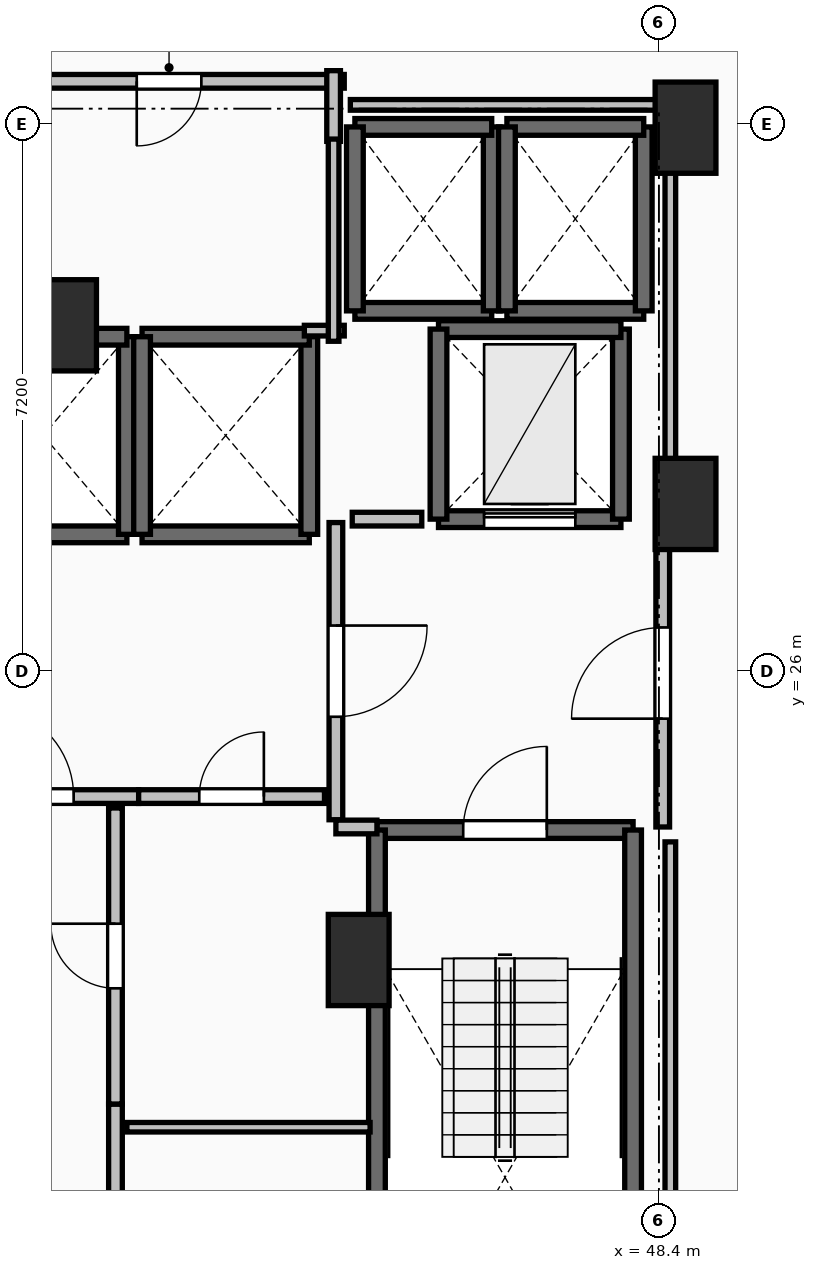
"""IFC4 building model, lengths in metres.
Left out: names, types, materials, properties, quantities, classifications, styles, units other than length and angle.
Written with IfcOpenShell. Run it as: python <this file> out.ifc"""

import sys

from ifc_helpers import new_model, si_unit, direction, frame, frame_2d, origin, origin_2d, place, context, subcontext, project, spatial, rectangle, extrude, element, fill, save


model = new_model("IFC4")
c1 = context("Model", 3, precision=1e-05, world=origin(), true_north=direction((0.0, 1.0)))
c2 = subcontext(c1, "Body", "Model", "MODEL_VIEW")
j1 = project(units=[si_unit("LENGTHUNIT", "METRE"), si_unit("PLANEANGLEUNIT", "RADIAN")], contexts=[c1])
p1 = place(None, origin())
s1 = spatial("IfcSite", under=j1, at=p1, CompositionType="ELEMENT")
p2 = place(p1, origin())
s2 = spatial("IfcBuilding", under=s1, at=p2, CompositionType="ELEMENT")
p3 = place(p2, frame((0.0, 0.0, 82.3)))
s3 = spatial("IfcBuildingStorey", under=s2, at=p3, CompositionType="ELEMENT", Elevation=82.3)
for number, where, z_axis, x_axis in (
    (1, (48.75, 33.15, 0.0), (0.0, 0.0, 1.0), (1.0, 0.0, 0.0)),
    (2, (48.75, 28.2, 0.0), (0.0, 0.0, 1.0), (1.0, 0.0, 0.0)),
    (3, (44.45, 22.2, 0.0), (0.0, 0.0, 1.0), (1.0, 0.0, 0.0)),
    (4, (40.6, 30.55, 0.0), (0.0, 0.0, 1.0), (1.0, 0.0, 0.0)),
):
    element("IfcColumn", number, at=place(p3, frame(where, z_axis=z_axis, x_axis=x_axis)), inside=s3, PredefinedType="PILASTER", context=c2, shape_type="SweptSolid", body=[
        extrude(rectangle(XDim=0.8, YDim=1.2, at=origin_2d()), origin(), (0.0, 0.0, 1.0), 3.5),
    ])
p4 = place(p3, frame((44.69, 23.91, 0.0), z_axis=(0.0, 0.0, 1.0), x_axis=(1.0, 0.0, 0.0)))
e5 = element("IfcWall", 5, at=p4, inside=s3, PredefinedType="SOLIDWALL", context=c2, shape_type="SweptSolid", body=[
    extrude(rectangle(XDim=3.37, YDim=0.22, at=frame_2d((1.685, 0.0))), origin(), (0.0, 0.0, 1.0), 3.24),
])
p5 = place(p4, frame((1.135, 0.0, 0.0)))
e6 = element("IfcOpeningElement", 6, at=p5, cuts=e5, PredefinedType="OPENING", context=c2, shape_type="SweptSolid", body=[
    extrude(rectangle(XDim=1.1, YDim=2.15, at=frame_2d((0.55, 1.075))), frame((0.0, 0.125, 0.0), z_axis=(0.0, -1.0, 0.0), x_axis=(1.0, 0.0, 0.0)), (0.0, 0.0, 1.0), 0.25),
])
for number, where, z_axis, x_axis in (
    (7, (48.06, 23.91, 0.0), (0.0, 0.0, 1.0), (0.0, -1.0, 0.0)),
    (8, (44.69, 16.49, 0.0), (0.0, 0.0, 1.0), (0.0, 1.0, 0.0)),
):
    element("IfcWall", number, at=place(p3, frame(where, z_axis=z_axis, x_axis=x_axis)), inside=s3, PredefinedType="SOLIDWALL", context=c2, shape_type="SweptSolid", body=[
        extrude(rectangle(XDim=7.42, YDim=0.22, at=frame_2d((3.71, 0.0))), origin(), (0.0, 0.0, 1.0), 3.24),
    ])
p6 = place(p3, frame((39.2, 27.8, 0.0), z_axis=(0.0, 0.0, 1.0), x_axis=(1.0, 0.0, 0.0)))
e9 = element("IfcWall", 9, at=p6, inside=s3, PredefinedType="SOLIDWALL", context=c2, shape_type="SweptSolid", body=[
    extrude(rectangle(XDim=2.2, YDim=0.22, at=frame_2d((1.1, 0.0))), origin(), (0.0, 0.0, 1.0), 3.24),
])
p7 = place(p3, frame((41.4, 27.8, 0.0), z_axis=(0.0, 0.0, 1.0), x_axis=(0.0, 1.0, 0.0)))
e10 = element("IfcWall", 10, at=p7, inside=s3, PredefinedType="SOLIDWALL", context=c2, shape_type="SweptSolid", body=[
    extrude(rectangle(XDim=2.6, YDim=0.22, at=frame_2d((1.3, 0.0))), origin(), (0.0, 0.0, 1.0), 3.24),
])
for number, where, z_axis, x_axis in (
    (11, (41.4, 30.4, 0.0), (0.0, 0.0, 1.0), (-1.0, 0.0, 0.0)),
    (12, (41.6, 27.8, 0.0), (0.0, 0.0, 1.0), (1.0, 0.0, 0.0)),
):
    element("IfcWall", number, at=place(p3, frame(where, z_axis=z_axis, x_axis=x_axis)), inside=s3, PredefinedType="SOLIDWALL", context=c2, shape_type="SweptSolid", body=[
        extrude(rectangle(XDim=2.2, YDim=0.22, at=frame_2d((1.1, 0.0))), origin(), (0.0, 0.0, 1.0), 3.24),
    ])
p8 = place(p3, frame((43.8, 27.8, 0.0), z_axis=(0.0, 0.0, 1.0), x_axis=(0.0, 1.0, 0.0)))
e13 = element("IfcWall", 13, at=p8, inside=s3, PredefinedType="SOLIDWALL", context=c2, shape_type="SweptSolid", body=[
    extrude(rectangle(XDim=2.6, YDim=0.22, at=frame_2d((1.3, 0.0))), origin(), (0.0, 0.0, 1.0), 3.24),
])
p9 = place(p3, frame((43.8, 30.4, 0.0), z_axis=(0.0, 0.0, 1.0), x_axis=(-1.0, 0.0, 0.0)))
e14 = element("IfcWall", 14, at=p9, inside=s3, PredefinedType="SOLIDWALL", context=c2, shape_type="SweptSolid", body=[
    extrude(rectangle(XDim=2.2, YDim=0.22, at=frame_2d((1.1, 0.0))), origin(), (0.0, 0.0, 1.0), 3.24),
])
p10 = place(p3, frame((41.6, 30.4, 0.0), z_axis=(0.0, 0.0, 1.0), x_axis=(0.0, -1.0, 0.0)))
e15 = element("IfcWall", 15, at=p10, inside=s3, PredefinedType="SOLIDWALL", context=c2, shape_type="SweptSolid", body=[
    extrude(rectangle(XDim=2.6, YDim=0.22, at=frame_2d((1.3, 0.0))), origin(), (0.0, 0.0, 1.0), 3.24),
])
p11 = place(p3, frame((44.4, 30.74, 0.0), z_axis=(0.0, 0.0, 1.0), x_axis=(1.0, 0.0, 0.0)))
e16 = element("IfcWall", 16, at=p11, inside=s3, PredefinedType="SOLIDWALL", context=c2, shape_type="SweptSolid", body=[
    extrude(rectangle(XDim=1.8, YDim=0.22, at=frame_2d((0.9, 0.0))), origin(), (0.0, 0.0, 1.0), 3.24),
])
p12 = place(p3, frame((46.2, 30.74, 0.0), z_axis=(0.0, 0.0, 1.0), x_axis=(0.0, 1.0, 0.0)))
e17 = element("IfcWall", 17, at=p12, inside=s3, PredefinedType="SOLIDWALL", context=c2, shape_type="SweptSolid", body=[
    extrude(rectangle(XDim=2.42, YDim=0.22, at=frame_2d((1.21, 0.0))), origin(), (0.0, 0.0, 1.0), 3.24),
])
p13 = place(p3, frame((46.2, 33.16, 0.0), z_axis=(0.0, 0.0, 1.0), x_axis=(-1.0, 0.0, 0.0)))
e18 = element("IfcWall", 18, at=p13, inside=s3, PredefinedType="SOLIDWALL", context=c2, shape_type="SweptSolid", body=[
    extrude(rectangle(XDim=1.8, YDim=0.22, at=frame_2d((0.9, 0.0))), origin(), (0.0, 0.0, 1.0), 3.24),
])
p14 = place(p3, frame((44.4, 33.16, 0.0), z_axis=(0.0, 0.0, 1.0), x_axis=(0.0, -1.0, 0.0)))
e19 = element("IfcWall", 19, at=p14, inside=s3, PredefinedType="SOLIDWALL", context=c2, shape_type="SweptSolid", body=[
    extrude(rectangle(XDim=2.42, YDim=0.22, at=frame_2d((1.21, 0.0))), origin(), (0.0, 0.0, 1.0), 3.24),
])
p15 = place(p3, frame((46.4, 30.74, 0.0), z_axis=(0.0, 0.0, 1.0), x_axis=(1.0, 0.0, 0.0)))
e20 = element("IfcWall", 20, at=p15, inside=s3, PredefinedType="SOLIDWALL", context=c2, shape_type="SweptSolid", body=[
    extrude(rectangle(XDim=1.8, YDim=0.22, at=frame_2d((0.9, 0.0))), origin(), (0.0, 0.0, 1.0), 3.24),
])
p16 = place(p3, frame((48.2, 30.74, 0.0), z_axis=(0.0, 0.0, 1.0), x_axis=(0.0, 1.0, 0.0)))
e21 = element("IfcWall", 21, at=p16, inside=s3, PredefinedType="SOLIDWALL", context=c2, shape_type="SweptSolid", body=[
    extrude(rectangle(XDim=2.42, YDim=0.22, at=frame_2d((1.21, 0.0))), origin(), (0.0, 0.0, 1.0), 3.24),
])
p17 = place(p3, frame((48.2, 33.16, 0.0), z_axis=(0.0, 0.0, 1.0), x_axis=(-1.0, 0.0, 0.0)))
e22 = element("IfcWall", 22, at=p17, inside=s3, PredefinedType="SOLIDWALL", context=c2, shape_type="SweptSolid", body=[
    extrude(rectangle(XDim=1.8, YDim=0.22, at=frame_2d((0.9, 0.0))), origin(), (0.0, 0.0, 1.0), 3.24),
])
p18 = place(p3, frame((46.4, 33.16, 0.0), z_axis=(0.0, 0.0, 1.0), x_axis=(0.0, -1.0, 0.0)))
e23 = element("IfcWall", 23, at=p18, inside=s3, PredefinedType="SOLIDWALL", context=c2, shape_type="SweptSolid", body=[
    extrude(rectangle(XDim=2.42, YDim=0.22, at=frame_2d((1.21, 0.0))), origin(), (0.0, 0.0, 1.0), 3.24),
])
p19 = place(p3, frame((45.5, 28.0, 0.0), z_axis=(0.0, 0.0, 1.0), x_axis=(1.0, 0.0, 0.0)))
e24 = element("IfcWall", 24, at=p19, inside=s3, PredefinedType="SHEAR", context=c2, shape_type="SweptSolid", body=[
    extrude(rectangle(XDim=2.4, YDim=0.22, at=frame_2d((1.2, 0.0))), origin(), (0.0, 0.0, 1.0), 3.24),
])
p20 = place(p19, frame((0.6, 0.0, 0.0)))
e25 = element("IfcOpeningElement", 25, at=p20, cuts=e24, PredefinedType="OPENING", context=c2, shape_type="SweptSolid", body=[
    extrude(rectangle(XDim=1.2, YDim=2.2, at=frame_2d((0.6, 1.1))), frame((0.0, 0.125, 0.0), z_axis=(0.0, -1.0, 0.0), x_axis=(1.0, 0.0, 0.0)), (0.0, 0.0, 1.0), 0.25),
])
p21 = place(p3, frame((47.9, 28.0, 0.0), z_axis=(0.0, 0.0, 1.0), x_axis=(0.0, 1.0, 0.0)))
e26 = element("IfcWall", 26, at=p21, inside=s3, PredefinedType="SHEAR", context=c2, shape_type="SweptSolid", body=[
    extrude(rectangle(XDim=2.5, YDim=0.22, at=frame_2d((1.25, 0.0))), origin(), (0.0, 0.0, 1.0), 3.24),
])
p22 = place(p3, frame((47.9, 30.5, 0.0), z_axis=(0.0, 0.0, 1.0), x_axis=(-1.0, 0.0, 0.0)))
e27 = element("IfcWall", 27, at=p22, inside=s3, PredefinedType="SHEAR", context=c2, shape_type="SweptSolid", body=[
    extrude(rectangle(XDim=2.4, YDim=0.22, at=frame_2d((1.2, 0.0))), origin(), (0.0, 0.0, 1.0), 3.24),
])
p23 = place(p3, frame((45.5, 30.5, 0.0), z_axis=(0.0, 0.0, 1.0), x_axis=(0.0, -1.0, 0.0)))
e28 = element("IfcWall", 28, at=p23, inside=s3, PredefinedType="SHEAR", context=c2, shape_type="SweptSolid", body=[
    extrude(rectangle(XDim=2.5, YDim=0.22, at=frame_2d((1.25, 0.0))), origin(), (0.0, 0.0, 1.0), 3.24),
])
p24 = place(p3, frame((44.15, 27.955, 0.0), z_axis=(0.0, 0.0, 1.0), x_axis=(0.0, -1.0, 0.0)))
e29 = element("IfcWall", 29, at=p24, inside=s3, PredefinedType="PARTITIONING", context=c2, shape_type="SweptSolid", body=[
    extrude(rectangle(XDim=3.91, YDim=0.18, at=frame_2d((1.955, 0.0))), origin(), (0.0, 0.0, 1.0), 3.24),
])
p25 = place(p24, frame((1.355, 0.0, 0.0)))
e30 = element("IfcOpeningElement", 30, at=p25, cuts=e29, PredefinedType="OPENING", context=c2, shape_type="SweptSolid", body=[
    extrude(rectangle(XDim=1.2, YDim=2.15, at=frame_2d((0.6, 1.075))), frame((0.0, 0.105, 0.0), z_axis=(0.0, -1.0, 0.0), x_axis=(1.0, 0.0, 0.0)), (0.0, 0.0, 1.0), 0.21),
])
p26 = place(p3, frame((44.15, 23.95, 0.0), z_axis=(0.0, 0.0, 1.0), x_axis=(1.0, 0.0, 0.0)))
e31 = element("IfcWall", 31, at=p26, inside=s3, PredefinedType="PARTITIONING", context=c2, shape_type="SweptSolid", body=[
    extrude(rectangle(XDim=0.54, YDim=0.18, at=frame_2d((0.27, 0.0))), origin(), (0.0, 0.0, 1.0), 3.24),
])
p27 = place(p3, frame((48.45, 23.95, 0.0), z_axis=(0.0, 0.0, 1.0), x_axis=(0.0, 1.0, 0.0)))
e32 = element("IfcWall", 32, at=p27, inside=s3, PredefinedType="PARTITIONING", context=c2, shape_type="SweptSolid", body=[
    extrude(rectangle(XDim=4.05, YDim=0.18, at=frame_2d((2.025, 0.0))), origin(), (0.0, 0.0, 1.0), 3.24),
])
p28 = place(p27, frame((1.425, 0.0, 0.0)))
e33 = element("IfcOpeningElement", 33, at=p28, cuts=e32, PredefinedType="OPENING", context=c2, shape_type="SweptSolid", body=[
    extrude(rectangle(XDim=1.2, YDim=2.15, at=frame_2d((0.6, 1.075))), frame((0.0, 0.105, 0.0), z_axis=(0.0, -1.0, 0.0), x_axis=(1.0, 0.0, 0.0)), (0.0, 0.0, 1.0), 0.21),
])
p29 = place(p3, frame((38.645, 24.35, 0.0), z_axis=(0.0, 0.0, 1.0), x_axis=(1.0, 0.0, 0.0)))
e34 = element("IfcWall", 34, at=p29, inside=s3, PredefinedType="PARTITIONING", context=c2, shape_type="SweptSolid", body=[
    extrude(rectangle(XDim=2.91, YDim=0.18, at=frame_2d((1.455, 0.0))), origin(), (0.0, 0.0, 1.0), 3.24),
])
p30 = place(p29, frame((0.855, 0.0, 0.0)))
e35 = element("IfcOpeningElement", 35, at=p30, cuts=e34, PredefinedType="OPENING", context=c2, shape_type="SweptSolid", body=[
    extrude(rectangle(XDim=1.2, YDim=2.15, at=frame_2d((0.6, 1.075))), frame((0.0, 0.105, 0.0), z_axis=(0.0, -1.0, 0.0), x_axis=(1.0, 0.0, 0.0)), (0.0, 0.0, 1.0), 0.21),
])
p31 = place(p3, frame((41.555, 24.35, 0.0), z_axis=(0.0, 0.0, 1.0), x_axis=(1.0, 0.0, 0.0)))
e36 = element("IfcWall", 36, at=p31, inside=s3, PredefinedType="PARTITIONING", context=c2, shape_type="SweptSolid", body=[
    extrude(rectangle(XDim=2.445, YDim=0.18, at=frame_2d((1.223, 0.0))), origin(), (0.0, 0.0, 1.0), 3.24),
])
p32 = place(p31, frame((0.798, 0.0, 0.0)))
e37 = element("IfcOpeningElement", 37, at=p32, cuts=e36, PredefinedType="OPENING", context=c2, shape_type="SweptSolid", body=[
    extrude(rectangle(XDim=0.85, YDim=2.1, at=frame_2d((0.425, 1.05))), frame((0.0, 0.105, 0.0), z_axis=(0.0, -1.0, 0.0), x_axis=(1.0, 0.0, 0.0)), (0.0, 0.0, 1.0), 0.21),
])
p33 = place(p3, frame((41.25, 16.32, 0.0), z_axis=(0.0, 0.0, 1.0), x_axis=(0.0, 1.0, 0.0)))
e38 = element("IfcWall", 38, at=p33, inside=s3, PredefinedType="PARTITIONING", context=c2, shape_type="SweptSolid", body=[
    extrude(rectangle(XDim=3.985, YDim=0.18, at=frame_2d((1.992, 0.0))), origin(), (0.0, 0.0, 1.0), 3.24),
])
p34 = place(p33, frame((1.593, 0.0, 0.0)))
e39 = element("IfcOpeningElement", 39, at=p34, cuts=e38, PredefinedType="OPENING", context=c2, shape_type="SweptSolid", body=[
    extrude(rectangle(XDim=0.8, YDim=2.05, at=frame_2d((0.4, 1.025))), frame((0.0, 0.105, 0.0), z_axis=(0.0, -1.0, 0.0), x_axis=(1.0, 0.0, 0.0)), (0.0, 0.0, 1.0), 0.21),
])
p35 = place(p3, frame((41.25, 20.305, 0.0), z_axis=(0.0, 0.0, 1.0), x_axis=(0.0, 1.0, 0.0)))
e40 = element("IfcWall", 40, at=p35, inside=s3, PredefinedType="PARTITIONING", context=c2, shape_type="SweptSolid", body=[
    extrude(rectangle(XDim=3.895, YDim=0.18, at=frame_2d((1.948, 0.0))), origin(), (0.0, 0.0, 1.0), 3.24),
])
p36 = place(p35, frame((1.522, 0.0, 0.0)))
e41 = element("IfcOpeningElement", 41, at=p36, cuts=e40, PredefinedType="OPENING", context=c2, shape_type="SweptSolid", body=[
    extrude(rectangle(XDim=0.85, YDim=2.1, at=frame_2d((0.425, 1.05))), frame((0.0, 0.105, 0.0), z_axis=(0.0, -1.0, 0.0), x_axis=(1.0, 0.0, 0.0)), (0.0, 0.0, 1.0), 0.21),
])
p37 = place(p3, frame((44.6, 20.0, 0.0), z_axis=(0.0, 0.0, 1.0), x_axis=(-1.0, 0.0, 0.0)))
e42 = element("IfcWall", 42, at=p37, inside=s3, PredefinedType="PARTITIONING", context=c2, shape_type="SweptSolid", body=[
    extrude(rectangle(XDim=3.2, YDim=0.125, at=frame_2d((1.6, 0.0))), origin(), (0.0, 0.0, 1.0), 3.24),
])
p38 = place(p3, frame((44.26, 33.76, 0.0), z_axis=(0.0, 0.0, 1.0), x_axis=(-1.0, 0.0, 0.0)))
e43 = element("IfcWall", 43, at=p38, inside=s3, PredefinedType="PARTITIONING", context=c2, shape_type="SweptSolid", body=[
    extrude(rectangle(XDim=4.61, YDim=0.18, at=frame_2d((2.305, 0.0))), origin(), (0.0, 0.0, 1.0), 3.24),
])
p39 = place(p38, frame((1.88, 0.0, 0.0)))
e44 = element("IfcOpeningElement", 44, at=p39, cuts=e43, PredefinedType="OPENING", context=c2, shape_type="SweptSolid", body=[
    extrude(rectangle(XDim=0.85, YDim=2.1, at=frame_2d((0.425, 1.05))), frame((0.0, 0.105, 0.0), z_axis=(0.0, -1.0, 0.0), x_axis=(1.0, 0.0, 0.0)), (0.0, 0.0, 1.0), 0.21),
])
p40 = place(p3, frame((44.12, 32.97, 0.0), z_axis=(0.0, 0.0, 1.0), x_axis=(0.0, 1.0, 0.0)))
e45 = element("IfcWall", 45, at=p40, inside=s3, PredefinedType="PARTITIONING", context=c2, shape_type="SweptSolid", body=[
    extrude(rectangle(XDim=0.93, YDim=0.18, at=frame_2d((0.465, 0.0))), origin(), (0.0, 0.0, 1.0), 3.24),
])
p41 = place(p3, frame((45.28, 28.0, 0.0), z_axis=(0.0, 0.0, 1.0), x_axis=(-1.0, 0.0, 0.0)))
e46 = element("IfcWall", 46, at=p41, inside=s3, PredefinedType="PARTITIONING", context=c2, shape_type="SweptSolid", body=[
    extrude(rectangle(XDim=0.915, YDim=0.18, at=frame_2d((0.458, 0.0))), origin(), (0.0, 0.0, 1.0), 3.24),
])
p42 = place(p3, frame((43.735, 30.48, 0.0), z_axis=(0.0, 0.0, 1.0), x_axis=(1.0, 0.0, 0.0)))
e47 = element("IfcWall", 47, at=p42, inside=s3, PredefinedType="PARTITIONING", context=c2, shape_type="SweptSolid", body=[
    extrude(rectangle(XDim=0.525, YDim=0.14, at=frame_2d((0.262, 0.0))), origin(), (0.0, 0.0, 1.0), 3.24),
])
p43 = place(p3, frame((44.12, 30.34, 0.0), z_axis=(0.0, 0.0, 1.0), x_axis=(0.0, 1.0, 0.0)))
e48 = element("IfcWall", 48, at=p43, inside=s3, PredefinedType="PARTITIONING", context=c2, shape_type="SweptSolid", body=[
    extrude(rectangle(XDim=2.66, YDim=0.14, at=frame_2d((1.33, 0.0))), origin(), (0.0, 0.0, 1.0), 3.24),
])
p44 = place(p3, frame((44.34, 33.45, 0.0), z_axis=(0.0, 0.0, 1.0), x_axis=(1.0, 0.0, 0.0)))
e49 = element("IfcWall", 49, at=p44, inside=s3, PredefinedType="PARTITIONING", context=c2, shape_type="SweptSolid", body=[
    extrude(rectangle(XDim=4.21, YDim=0.14, at=frame_2d((2.105, 0.0))), origin(), (0.0, 0.0, 1.0), 2.432),
])
p45 = place(p3, frame((48.55, 33.45, 0.0), z_axis=(0.0, 0.0, 1.0), x_axis=(0.0, -1.0, 0.0)))
e50 = element("IfcWall", 50, at=p45, inside=s3, PredefinedType="PARTITIONING", context=c2, shape_type="SweptSolid", body=[
    extrude(rectangle(XDim=5.254, YDim=0.14, at=frame_2d((2.627, 0.0))), origin(), (0.0, 0.0, 1.0), 2.432),
])
p46 = place(p3, frame((48.55, 23.754, 0.0), z_axis=(0.0, 0.0, 1.0), x_axis=(0.0, -1.0, 0.0)))
e51 = element("IfcWall", 51, at=p46, inside=s3, PredefinedType="PARTITIONING", context=c2, shape_type="SweptSolid", body=[
    extrude(rectangle(XDim=7.514, YDim=0.14, at=frame_2d((3.757, 0.0))), origin(), (0.0, 0.0, 1.0), 2.432),
])
p47 = place(p5, origin())
e52 = element("IfcDoor", 52, at=p47, inside=s3, OperationType="SINGLE_SWING_RIGHT", PredefinedType="DOOR", context=c2, shape_type="SweptSolid", body=[
    extrude(rectangle(XDim=1.1, YDim=2.15, at=frame_2d((0.55, 1.075))), frame((0.0, 0.025, 0.0), z_axis=(0.0, -1.0, 0.0), x_axis=(1.0, 0.0, 0.0)), (0.0, 0.0, 1.0), 0.05),
])
fill(e6, e52)
p48 = place(p20, origin())
e53 = element("IfcDoor", 53, at=p48, inside=s3, OperationType="SLIDING_TO_LEFT", PredefinedType="DOOR", context=c2, shape_type="SweptSolid", body=[
    extrude(rectangle(XDim=1.2, YDim=2.2, at=frame_2d((0.6, 1.1))), frame((0.0, 0.025, 0.0), z_axis=(0.0, -1.0, 0.0), x_axis=(1.0, 0.0, 0.0)), (0.0, 0.0, 1.0), 0.05),
])
fill(e25, e53)
p49 = place(p25, origin())
e54 = element("IfcDoor", 54, at=p49, inside=s3, OperationType="SINGLE_SWING_LEFT", PredefinedType="DOOR", context=c2, shape_type="SweptSolid", body=[
    extrude(rectangle(XDim=1.2, YDim=2.15, at=frame_2d((0.6, 1.075))), frame((0.0, 0.025, 0.0), z_axis=(0.0, -1.0, 0.0), x_axis=(1.0, 0.0, 0.0)), (0.0, 0.0, 1.0), 0.05),
])
fill(e30, e54)
p50 = place(p28, origin())
e55 = element("IfcDoor", 55, at=p50, inside=s3, OperationType="SINGLE_SWING_LEFT", PredefinedType="DOOR", context=c2, shape_type="SweptSolid", body=[
    extrude(rectangle(XDim=1.2, YDim=2.15, at=frame_2d((0.6, 1.075))), frame((0.0, 0.025, 0.0), z_axis=(0.0, -1.0, 0.0), x_axis=(1.0, 0.0, 0.0)), (0.0, 0.0, 1.0), 0.05),
])
fill(e33, e55)
p51 = place(p30, origin())
e56 = element("IfcDoor", 56, at=p51, inside=s3, OperationType="SINGLE_SWING_LEFT", PredefinedType="DOOR", context=c2, shape_type="SweptSolid", body=[
    extrude(rectangle(XDim=1.2, YDim=2.15, at=frame_2d((0.6, 1.075))), frame((0.0, 0.025, 0.0), z_axis=(0.0, -1.0, 0.0), x_axis=(1.0, 0.0, 0.0)), (0.0, 0.0, 1.0), 0.05),
])
fill(e35, e56)
p52 = place(p32, origin())
e57 = element("IfcDoor", 57, at=p52, inside=s3, OperationType="SINGLE_SWING_RIGHT", PredefinedType="DOOR", context=c2, shape_type="SweptSolid", body=[
    extrude(rectangle(XDim=0.85, YDim=2.1, at=frame_2d((0.425, 1.05))), frame((0.0, 0.025, 0.0), z_axis=(0.0, -1.0, 0.0), x_axis=(1.0, 0.0, 0.0)), (0.0, 0.0, 1.0), 0.05),
])
fill(e37, e57)
p53 = place(p36, origin())
e58 = element("IfcDoor", 58, at=p53, inside=s3, OperationType="SINGLE_SWING_RIGHT", PredefinedType="DOOR", context=c2, shape_type="SweptSolid", body=[
    extrude(rectangle(XDim=0.85, YDim=2.1, at=frame_2d((0.425, 1.05))), frame((0.0, 0.025, 0.0), z_axis=(0.0, -1.0, 0.0), x_axis=(1.0, 0.0, 0.0)), (0.0, 0.0, 1.0), 0.05),
])
fill(e41, e58)
p54 = place(p39, origin())
e59 = element("IfcDoor", 59, at=p54, inside=s3, OperationType="SINGLE_SWING_RIGHT", PredefinedType="DOOR", context=c2, shape_type="SweptSolid", body=[
    extrude(rectangle(XDim=0.85, YDim=2.1, at=frame_2d((0.425, 1.05))), frame((0.0, 0.025, 0.0), z_axis=(0.0, -1.0, 0.0), x_axis=(1.0, 0.0, 0.0)), (0.0, 0.0, 1.0), 0.05),
])
fill(e44, e59)
save(model, sys.argv[1])
